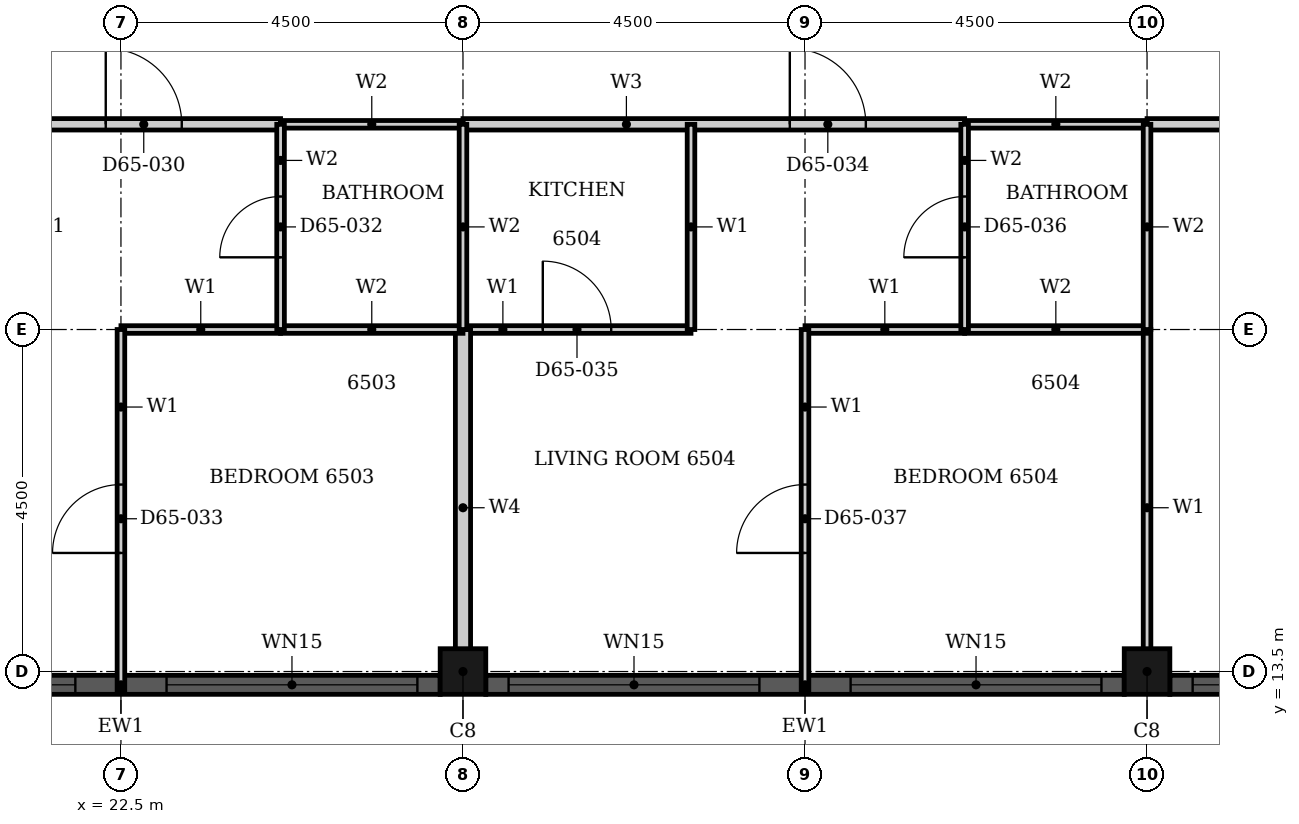
"""IFC4 building model, lengths in metres.
Left out: names, types, materials, properties, quantities, classifications, styles, units other than length and angle.
Written with IfcOpenShell. Run it as: python <this file> out.ifc"""

import sys

from ifc_helpers import new_model, si_unit, direction, frame, frame_2d, origin, origin_2d, place, context, subcontext, project, spatial, rectangle, hollow_rectangle, extrude, element, fill, save


model = new_model("IFC4")
c1 = context("Model", 3, precision=1e-05, world=origin(), true_north=direction((0.0, 1.0)))
c2 = subcontext(c1, "Body", "Model", "MODEL_VIEW")
j1 = project(units=[si_unit("LENGTHUNIT", "METRE"), si_unit("PLANEANGLEUNIT", "RADIAN")], contexts=[c1])
p1 = place(None, origin())
s1 = spatial("IfcSite", under=j1, at=p1, CompositionType="ELEMENT")
p2 = place(p1, origin())
s2 = spatial("IfcBuilding", under=s1, at=p2, CompositionType="ELEMENT")
p3 = place(p2, frame((0.0, 0.0, 256.4)))
s3 = spatial("IfcBuildingStorey", under=s2, at=p3, CompositionType="ELEMENT", Elevation=256.4)
for number, where, z_axis, x_axis in (
    (1, (27.0, 13.5, 0.0), (0.0, 0.0, 1.0), (1.0, 0.0, 0.0)),
    (2, (36.0, 13.5, 0.0), (0.0, 0.0, 1.0), (1.0, 0.0, 0.0)),
):
    element("IfcColumn", number, at=place(p3, frame(where, z_axis=z_axis, x_axis=x_axis)), inside=s3, PredefinedType="COLUMN", context=c2, shape_type="SweptSolid", body=[
        extrude(hollow_rectangle(XDim=0.6, YDim=0.6, WallThickness=0.02, at=origin_2d()), origin(), (0.0, 0.0, 1.0), 3.7),
    ])
p4 = place(p3, frame((18.3, 13.325, 0.0), z_axis=(0.0, 0.0, 1.0), x_axis=(1.0, 0.0, 0.0)))
e3 = element("IfcWall", 3, at=p4, inside=s3, PredefinedType="SOLIDWALL", context=c2, shape_type="SweptSolid", body=[
    extrude(rectangle(XDim=8.4, YDim=0.25, at=frame_2d((4.2, 0.0))), origin(), (0.0, 0.0, 1.0), 3.7),
])
p5 = place(p4, frame((0.3, 0.0, 0.45)))
e4 = element("IfcOpeningElement", 4, at=p5, cuts=e3, PredefinedType="OPENING", context=c2, shape_type="SweptSolid", body=[
    extrude(rectangle(XDim=3.3, YDim=2.3, at=frame_2d((1.65, 1.15))), frame((0.0, 0.135, 0.0), z_axis=(0.0, -1.0, 0.0), x_axis=(1.0, 0.0, 0.0)), (0.0, 0.0, 1.0), 0.27),
])
p6 = place(p4, frame((4.8, 0.0, 0.45)))
e5 = element("IfcOpeningElement", 5, at=p6, cuts=e3, PredefinedType="OPENING", context=c2, shape_type="SweptSolid", body=[
    extrude(rectangle(XDim=3.3, YDim=2.3, at=frame_2d((1.65, 1.15))), frame((0.0, 0.135, 0.0), z_axis=(0.0, -1.0, 0.0), x_axis=(1.0, 0.0, 0.0)), (0.0, 0.0, 1.0), 0.27),
])
p7 = place(p3, frame((27.3, 13.325, 0.0), z_axis=(0.0, 0.0, 1.0), x_axis=(1.0, 0.0, 0.0)))
e6 = element("IfcWall", 6, at=p7, inside=s3, PredefinedType="SOLIDWALL", context=c2, shape_type="SweptSolid", body=[
    extrude(rectangle(XDim=8.4, YDim=0.25, at=frame_2d((4.2, 0.0))), origin(), (0.0, 0.0, 1.0), 3.7),
])
p8 = place(p7, frame((0.3, 0.0, 0.45)))
e7 = element("IfcOpeningElement", 7, at=p8, cuts=e6, PredefinedType="OPENING", context=c2, shape_type="SweptSolid", body=[
    extrude(rectangle(XDim=3.3, YDim=2.3, at=frame_2d((1.65, 1.15))), frame((0.0, 0.135, 0.0), z_axis=(0.0, -1.0, 0.0), x_axis=(1.0, 0.0, 0.0)), (0.0, 0.0, 1.0), 0.27),
])
p9 = place(p7, frame((4.8, 0.0, 0.45)))
e8 = element("IfcOpeningElement", 8, at=p9, cuts=e6, PredefinedType="OPENING", context=c2, shape_type="SweptSolid", body=[
    extrude(rectangle(XDim=3.3, YDim=2.3, at=frame_2d((1.65, 1.15))), frame((0.0, 0.135, 0.0), z_axis=(0.0, -1.0, 0.0), x_axis=(1.0, 0.0, 0.0)), (0.0, 0.0, 1.0), 0.27),
])
p10 = place(p3, frame((36.3, 13.325, 0.0), z_axis=(0.0, 0.0, 1.0), x_axis=(1.0, 0.0, 0.0)))
e9 = element("IfcWall", 9, at=p10, inside=s3, PredefinedType="SOLIDWALL", context=c2, shape_type="SweptSolid", body=[
    extrude(rectangle(XDim=8.4, YDim=0.25, at=frame_2d((4.2, 0.0))), origin(), (0.0, 0.0, 1.0), 3.7),
])
p11 = place(p10, frame((0.3, 0.0, 0.45)))
e10 = element("IfcOpeningElement", 10, at=p11, cuts=e9, PredefinedType="OPENING", context=c2, shape_type="SweptSolid", body=[
    extrude(rectangle(XDim=3.3, YDim=2.3, at=frame_2d((1.65, 1.15))), frame((0.0, 0.135, 0.0), z_axis=(0.0, -1.0, 0.0), x_axis=(1.0, 0.0, 0.0)), (0.0, 0.0, 1.0), 0.27),
])
p12 = place(p10, frame((4.8, 0.0, 0.45)))
e11 = element("IfcOpeningElement", 11, at=p12, cuts=e9, PredefinedType="OPENING", context=c2, shape_type="SweptSolid", body=[
    extrude(rectangle(XDim=3.3, YDim=2.3, at=frame_2d((1.65, 1.15))), frame((0.0, 0.135, 0.0), z_axis=(0.0, -1.0, 0.0), x_axis=(1.0, 0.0, 0.0)), (0.0, 0.0, 1.0), 0.27),
])
p13 = place(p3, frame((18.0, 20.7, 0.0), z_axis=(0.0, 0.0, 1.0), x_axis=(1.0, 0.0, 0.0)))
e12 = element("IfcWall", 12, at=p13, inside=s3, PredefinedType="PARTITIONING", context=c2, shape_type="SweptSolid", body=[
    extrude(rectangle(XDim=6.6, YDim=0.15, at=frame_2d((3.3, 0.0))), origin(), (0.0, 0.0, 1.0), 3.4),
])
p14 = place(p13, frame((4.3, 0.0, 0.0)))
e13 = element("IfcOpeningElement", 13, at=p14, cuts=e12, PredefinedType="OPENING", context=c2, shape_type="SweptSolid", body=[
    extrude(rectangle(XDim=1.0, YDim=2.2, at=frame_2d((0.5, 1.1))), frame((0.0, 0.085, 0.0), z_axis=(0.0, -1.0, 0.0), x_axis=(1.0, 0.0, 0.0)), (0.0, 0.0, 1.0), 0.17),
])
p15 = place(p3, frame((27.0, 20.7, 0.0), z_axis=(0.0, 0.0, 1.0), x_axis=(1.0, 0.0, 0.0)))
e14 = element("IfcWall", 14, at=p15, inside=s3, PredefinedType="PARTITIONING", context=c2, shape_type="SweptSolid", body=[
    extrude(rectangle(XDim=6.6, YDim=0.15, at=frame_2d((3.3, 0.0))), origin(), (0.0, 0.0, 1.0), 3.4),
])
p16 = place(p15, frame((4.3, 0.0, 0.0)))
e15 = element("IfcOpeningElement", 15, at=p16, cuts=e14, PredefinedType="OPENING", context=c2, shape_type="SweptSolid", body=[
    extrude(rectangle(XDim=1.0, YDim=2.2, at=frame_2d((0.5, 1.1))), frame((0.0, 0.085, 0.0), z_axis=(0.0, -1.0, 0.0), x_axis=(1.0, 0.0, 0.0)), (0.0, 0.0, 1.0), 0.17),
])
p17 = place(p3, frame((36.0, 20.7, 0.0), z_axis=(0.0, 0.0, 1.0), x_axis=(1.0, 0.0, 0.0)))
e16 = element("IfcWall", 16, at=p17, inside=s3, PredefinedType="PARTITIONING", context=c2, shape_type="SweptSolid", body=[
    extrude(rectangle(XDim=13.55, YDim=0.15, at=frame_2d((6.775, 0.0))), origin(), (0.0, 0.0, 1.0), 3.4),
])
p18 = place(p17, frame((4.0, 0.0, 0.0)))
e17 = element("IfcOpeningElement", 17, at=p18, cuts=e16, PredefinedType="OPENING", context=c2, shape_type="SweptSolid", body=[
    extrude(rectangle(XDim=1.0, YDim=2.1, at=frame_2d((0.5, 1.05))), frame((0.0, 0.085, 0.0), z_axis=(0.0, -1.0, 0.0), x_axis=(1.0, 0.0, 0.0)), (0.0, 0.0, 1.0), 0.17),
])
for number, where, z_axis, x_axis in (
    (18, (22.5, 18.0, 0.0), (0.0, 0.0, 1.0), (1.0, 0.0, 0.0)),
    (19, (31.5, 18.0, 0.0), (0.0, 0.0, 1.0), (1.0, 0.0, 0.0)),
):
    element("IfcWall", number, at=place(p3, frame(where, z_axis=z_axis, x_axis=x_axis)), inside=s3, PredefinedType="PARTITIONING", context=c2, shape_type="SweptSolid", body=[
        extrude(rectangle(XDim=2.1, YDim=0.1, at=frame_2d((1.05, 0.0))), origin(), (0.0, 0.0, 1.0), 3.4),
    ])
p19 = place(p3, frame((27.0, 18.0, 0.0), z_axis=(0.0, 0.0, 1.0), x_axis=(1.0, 0.0, 0.0)))
e20 = element("IfcWall", 20, at=p19, inside=s3, PredefinedType="PARTITIONING", context=c2, shape_type="SweptSolid", body=[
    extrude(rectangle(XDim=3.0, YDim=0.1, at=frame_2d((1.5, 0.0))), origin(), (0.0, 0.0, 1.0), 3.4),
])
p20 = place(p19, frame((1.05, 0.0, 0.0)))
e21 = element("IfcOpeningElement", 21, at=p20, cuts=e20, PredefinedType="OPENING", context=c2, shape_type="SweptSolid", body=[
    extrude(rectangle(XDim=0.9, YDim=2.1, at=frame_2d((0.45, 1.05))), frame((0.0, 0.06, 0.0), z_axis=(0.0, -1.0, 0.0), x_axis=(1.0, 0.0, 0.0)), (0.0, 0.0, 1.0), 0.12),
])
p21 = place(p3, frame((22.5, 13.26, 0.0), z_axis=(0.0, 0.0, 1.0), x_axis=(0.0, 1.0, 0.0)))
e22 = element("IfcWall", 22, at=p21, inside=s3, PredefinedType="PARTITIONING", context=c2, shape_type="SweptSolid", body=[
    extrude(rectangle(XDim=4.74, YDim=0.1, at=frame_2d((2.37, 0.0))), origin(), (0.0, 0.0, 1.0), 3.4),
])
p22 = place(p21, frame((1.8, 0.0, 0.0)))
e23 = element("IfcOpeningElement", 23, at=p22, cuts=e22, PredefinedType="OPENING", context=c2, shape_type="SweptSolid", body=[
    extrude(rectangle(XDim=0.9, YDim=2.1, at=frame_2d((0.45, 1.05))), frame((0.0, 0.06, 0.0), z_axis=(0.0, -1.0, 0.0), x_axis=(1.0, 0.0, 0.0)), (0.0, 0.0, 1.0), 0.12),
])
p23 = place(p3, frame((30.0, 18.0, 0.0), z_axis=(0.0, 0.0, 1.0), x_axis=(0.0, 1.0, 0.0)))
e24 = element("IfcWall", 24, at=p23, inside=s3, PredefinedType="PARTITIONING", context=c2, shape_type="SweptSolid", body=[
    extrude(rectangle(XDim=2.7, YDim=0.1, at=frame_2d((1.35, 0.0))), origin(), (0.0, 0.0, 1.0), 3.4),
])
p24 = place(p3, frame((31.5, 13.26, 0.0), z_axis=(0.0, 0.0, 1.0), x_axis=(0.0, 1.0, 0.0)))
e25 = element("IfcWall", 25, at=p24, inside=s3, PredefinedType="PARTITIONING", context=c2, shape_type="SweptSolid", body=[
    extrude(rectangle(XDim=4.74, YDim=0.1, at=frame_2d((2.37, 0.0))), origin(), (0.0, 0.0, 1.0), 3.4),
])
p25 = place(p24, frame((1.8, 0.0, 0.0)))
e26 = element("IfcOpeningElement", 26, at=p25, cuts=e25, PredefinedType="OPENING", context=c2, shape_type="SweptSolid", body=[
    extrude(rectangle(XDim=0.9, YDim=2.1, at=frame_2d((0.45, 1.05))), frame((0.0, 0.06, 0.0), z_axis=(0.0, -1.0, 0.0), x_axis=(1.0, 0.0, 0.0)), (0.0, 0.0, 1.0), 0.12),
])
p26 = place(p3, frame((36.0, 13.31, 0.0), z_axis=(0.0, 0.0, 1.0), x_axis=(0.0, 1.0, 0.0)))
e27 = element("IfcWall", 27, at=p26, inside=s3, PredefinedType="PARTITIONING", context=c2, shape_type="SweptSolid", body=[
    extrude(rectangle(XDim=4.69, YDim=0.1, at=frame_2d((2.345, 0.0))), origin(), (0.0, 0.0, 1.0), 3.4),
])
p27 = place(p3, frame((27.0, 13.31, 0.0), z_axis=(0.0, 0.0, 1.0), x_axis=(0.0, 1.0, 0.0)))
e28 = element("IfcWall", 28, at=p27, inside=s3, PredefinedType="PARTITIONING", context=c2, shape_type="SweptSolid", body=[
    extrude(rectangle(XDim=4.69, YDim=0.2, at=frame_2d((2.345, 0.0))), origin(), (0.0, 0.0, 1.0), 3.4),
])
for number, where, z_axis, x_axis in (
    (29, (24.6, 18.0, 0.0), (0.0, 0.0, 1.0), (1.0, 0.0, 0.0)),
    (30, (33.6, 18.0, 0.0), (0.0, 0.0, 1.0), (1.0, 0.0, 0.0)),
    (31, (24.6, 20.7, 0.0), (0.0, 0.0, 1.0), (1.0, 0.0, 0.0)),
    (32, (33.6, 20.7, 0.0), (0.0, 0.0, 1.0), (1.0, 0.0, 0.0)),
):
    element("IfcWall", number, at=place(p3, frame(where, z_axis=z_axis, x_axis=x_axis)), inside=s3, PredefinedType="PARTITIONING", context=c2, shape_type="SweptSolid", body=[
        extrude(rectangle(XDim=2.4, YDim=0.1, at=frame_2d((1.2, 0.0))), origin(), (0.0, 0.0, 1.0), 3.4),
    ])
p28 = place(p3, frame((24.6, 18.0, 0.0), z_axis=(0.0, 0.0, 1.0), x_axis=(0.0, 1.0, 0.0)))
e33 = element("IfcWall", 33, at=p28, inside=s3, PredefinedType="PARTITIONING", context=c2, shape_type="SweptSolid", body=[
    extrude(rectangle(XDim=2.7, YDim=0.1, at=frame_2d((1.35, 0.0))), origin(), (0.0, 0.0, 1.0), 3.4),
])
p29 = place(p28, frame((0.95, 0.0, 0.0)))
e34 = element("IfcOpeningElement", 34, at=p29, cuts=e33, PredefinedType="OPENING", context=c2, shape_type="SweptSolid", body=[
    extrude(rectangle(XDim=0.8, YDim=2.1, at=frame_2d((0.4, 1.05))), frame((0.0, 0.06, 0.0), z_axis=(0.0, -1.0, 0.0), x_axis=(1.0, 0.0, 0.0)), (0.0, 0.0, 1.0), 0.12),
])
p30 = place(p3, frame((27.0, 18.0, 0.0), z_axis=(0.0, 0.0, 1.0), x_axis=(0.0, 1.0, 0.0)))
e35 = element("IfcWall", 35, at=p30, inside=s3, PredefinedType="PARTITIONING", context=c2, shape_type="SweptSolid", body=[
    extrude(rectangle(XDim=2.7, YDim=0.1, at=frame_2d((1.35, 0.0))), origin(), (0.0, 0.0, 1.0), 3.4),
])
p31 = place(p3, frame((33.6, 18.0, 0.0), z_axis=(0.0, 0.0, 1.0), x_axis=(0.0, 1.0, 0.0)))
e36 = element("IfcWall", 36, at=p31, inside=s3, PredefinedType="PARTITIONING", context=c2, shape_type="SweptSolid", body=[
    extrude(rectangle(XDim=2.7, YDim=0.1, at=frame_2d((1.35, 0.0))), origin(), (0.0, 0.0, 1.0), 3.4),
])
p32 = place(p31, frame((0.95, 0.0, 0.0)))
e37 = element("IfcOpeningElement", 37, at=p32, cuts=e36, PredefinedType="OPENING", context=c2, shape_type="SweptSolid", body=[
    extrude(rectangle(XDim=0.8, YDim=2.1, at=frame_2d((0.4, 1.05))), frame((0.0, 0.06, 0.0), z_axis=(0.0, -1.0, 0.0), x_axis=(1.0, 0.0, 0.0)), (0.0, 0.0, 1.0), 0.12),
])
p33 = place(p3, frame((36.0, 18.0, 0.0), z_axis=(0.0, 0.0, 1.0), x_axis=(0.0, 1.0, 0.0)))
e38 = element("IfcWall", 38, at=p33, inside=s3, PredefinedType="PARTITIONING", context=c2, shape_type="SweptSolid", body=[
    extrude(rectangle(XDim=2.7, YDim=0.1, at=frame_2d((1.35, 0.0))), origin(), (0.0, 0.0, 1.0), 3.4),
])
p34 = place(p5, origin())
e39 = element("IfcWindow", 39, at=p34, inside=s3, PartitioningType="SINGLE_PANEL", PredefinedType="WINDOW", context=c2, shape_type="SweptSolid", body=[
    extrude(rectangle(XDim=3.3, YDim=2.3, at=frame_2d((1.65, 1.15))), frame((0.0, 0.03, 0.0), z_axis=(0.0, -1.0, 0.0), x_axis=(1.0, 0.0, 0.0)), (0.0, 0.0, 1.0), 0.06),
])
fill(e4, e39)
p35 = place(p6, origin())
e40 = element("IfcWindow", 40, at=p35, inside=s3, PartitioningType="SINGLE_PANEL", PredefinedType="WINDOW", context=c2, shape_type="SweptSolid", body=[
    extrude(rectangle(XDim=3.3, YDim=2.3, at=frame_2d((1.65, 1.15))), frame((0.0, 0.03, 0.0), z_axis=(0.0, -1.0, 0.0), x_axis=(1.0, 0.0, 0.0)), (0.0, 0.0, 1.0), 0.06),
])
fill(e5, e40)
p36 = place(p8, origin())
e41 = element("IfcWindow", 41, at=p36, inside=s3, PartitioningType="SINGLE_PANEL", PredefinedType="WINDOW", context=c2, shape_type="SweptSolid", body=[
    extrude(rectangle(XDim=3.3, YDim=2.3, at=frame_2d((1.65, 1.15))), frame((0.0, 0.03, 0.0), z_axis=(0.0, -1.0, 0.0), x_axis=(1.0, 0.0, 0.0)), (0.0, 0.0, 1.0), 0.06),
])
fill(e7, e41)
p37 = place(p9, origin())
e42 = element("IfcWindow", 42, at=p37, inside=s3, PartitioningType="SINGLE_PANEL", PredefinedType="WINDOW", context=c2, shape_type="SweptSolid", body=[
    extrude(rectangle(XDim=3.3, YDim=2.3, at=frame_2d((1.65, 1.15))), frame((0.0, 0.03, 0.0), z_axis=(0.0, -1.0, 0.0), x_axis=(1.0, 0.0, 0.0)), (0.0, 0.0, 1.0), 0.06),
])
fill(e8, e42)
p38 = place(p11, origin())
e43 = element("IfcWindow", 43, at=p38, inside=s3, PartitioningType="SINGLE_PANEL", PredefinedType="WINDOW", context=c2, shape_type="SweptSolid", body=[
    extrude(rectangle(XDim=3.3, YDim=2.3, at=frame_2d((1.65, 1.15))), frame((0.0, 0.03, 0.0), z_axis=(0.0, -1.0, 0.0), x_axis=(1.0, 0.0, 0.0)), (0.0, 0.0, 1.0), 0.06),
])
fill(e10, e43)
p39 = place(p14, origin())
e44 = element("IfcDoor", 44, at=p39, inside=s3, OperationType="SINGLE_SWING_LEFT", PredefinedType="DOOR", context=c2, shape_type="SweptSolid", body=[
    extrude(rectangle(XDim=1.0, YDim=2.2, at=frame_2d((0.5, 1.1))), frame((0.0, 0.025, 0.0), z_axis=(0.0, -1.0, 0.0), x_axis=(1.0, 0.0, 0.0)), (0.0, 0.0, 1.0), 0.05),
])
fill(e13, e44)
p40 = place(p29, origin())
e45 = element("IfcDoor", 45, at=p40, inside=s3, OperationType="SINGLE_SWING_RIGHT", PredefinedType="DOOR", context=c2, shape_type="SweptSolid", body=[
    extrude(rectangle(XDim=0.8, YDim=2.1, at=frame_2d((0.4, 1.05))), frame((0.0, 0.025, 0.0), z_axis=(0.0, -1.0, 0.0), x_axis=(1.0, 0.0, 0.0)), (0.0, 0.0, 1.0), 0.05),
])
fill(e34, e45)
p41 = place(p22, origin())
e46 = element("IfcDoor", 46, at=p41, inside=s3, OperationType="SINGLE_SWING_RIGHT", PredefinedType="DOOR", context=c2, shape_type="SweptSolid", body=[
    extrude(rectangle(XDim=0.9, YDim=2.1, at=frame_2d((0.45, 1.05))), frame((0.0, 0.025, 0.0), z_axis=(0.0, -1.0, 0.0), x_axis=(1.0, 0.0, 0.0)), (0.0, 0.0, 1.0), 0.05),
])
fill(e23, e46)
p42 = place(p16, origin())
e47 = element("IfcDoor", 47, at=p42, inside=s3, OperationType="SINGLE_SWING_LEFT", PredefinedType="DOOR", context=c2, shape_type="SweptSolid", body=[
    extrude(rectangle(XDim=1.0, YDim=2.2, at=frame_2d((0.5, 1.1))), frame((0.0, 0.025, 0.0), z_axis=(0.0, -1.0, 0.0), x_axis=(1.0, 0.0, 0.0)), (0.0, 0.0, 1.0), 0.05),
])
fill(e15, e47)
p43 = place(p20, origin())
e48 = element("IfcDoor", 48, at=p43, inside=s3, OperationType="SINGLE_SWING_LEFT", PredefinedType="DOOR", context=c2, shape_type="SweptSolid", body=[
    extrude(rectangle(XDim=0.9, YDim=2.1, at=frame_2d((0.45, 1.05))), frame((0.0, 0.025, 0.0), z_axis=(0.0, -1.0, 0.0), x_axis=(1.0, 0.0, 0.0)), (0.0, 0.0, 1.0), 0.05),
])
fill(e21, e48)
p44 = place(p32, origin())
e49 = element("IfcDoor", 49, at=p44, inside=s3, OperationType="SINGLE_SWING_RIGHT", PredefinedType="DOOR", context=c2, shape_type="SweptSolid", body=[
    extrude(rectangle(XDim=0.8, YDim=2.1, at=frame_2d((0.4, 1.05))), frame((0.0, 0.025, 0.0), z_axis=(0.0, -1.0, 0.0), x_axis=(1.0, 0.0, 0.0)), (0.0, 0.0, 1.0), 0.05),
])
fill(e37, e49)
p45 = place(p25, origin())
e50 = element("IfcDoor", 50, at=p45, inside=s3, OperationType="SINGLE_SWING_LEFT", PredefinedType="DOOR", context=c2, shape_type="SweptSolid", body=[
    extrude(rectangle(XDim=0.9, YDim=2.1, at=frame_2d((0.45, 1.05))), frame((0.0, 0.025, 0.0), z_axis=(0.0, -1.0, 0.0), x_axis=(1.0, 0.0, 0.0)), (0.0, 0.0, 1.0), 0.05),
])
fill(e26, e50)
save(model, sys.argv[1])
